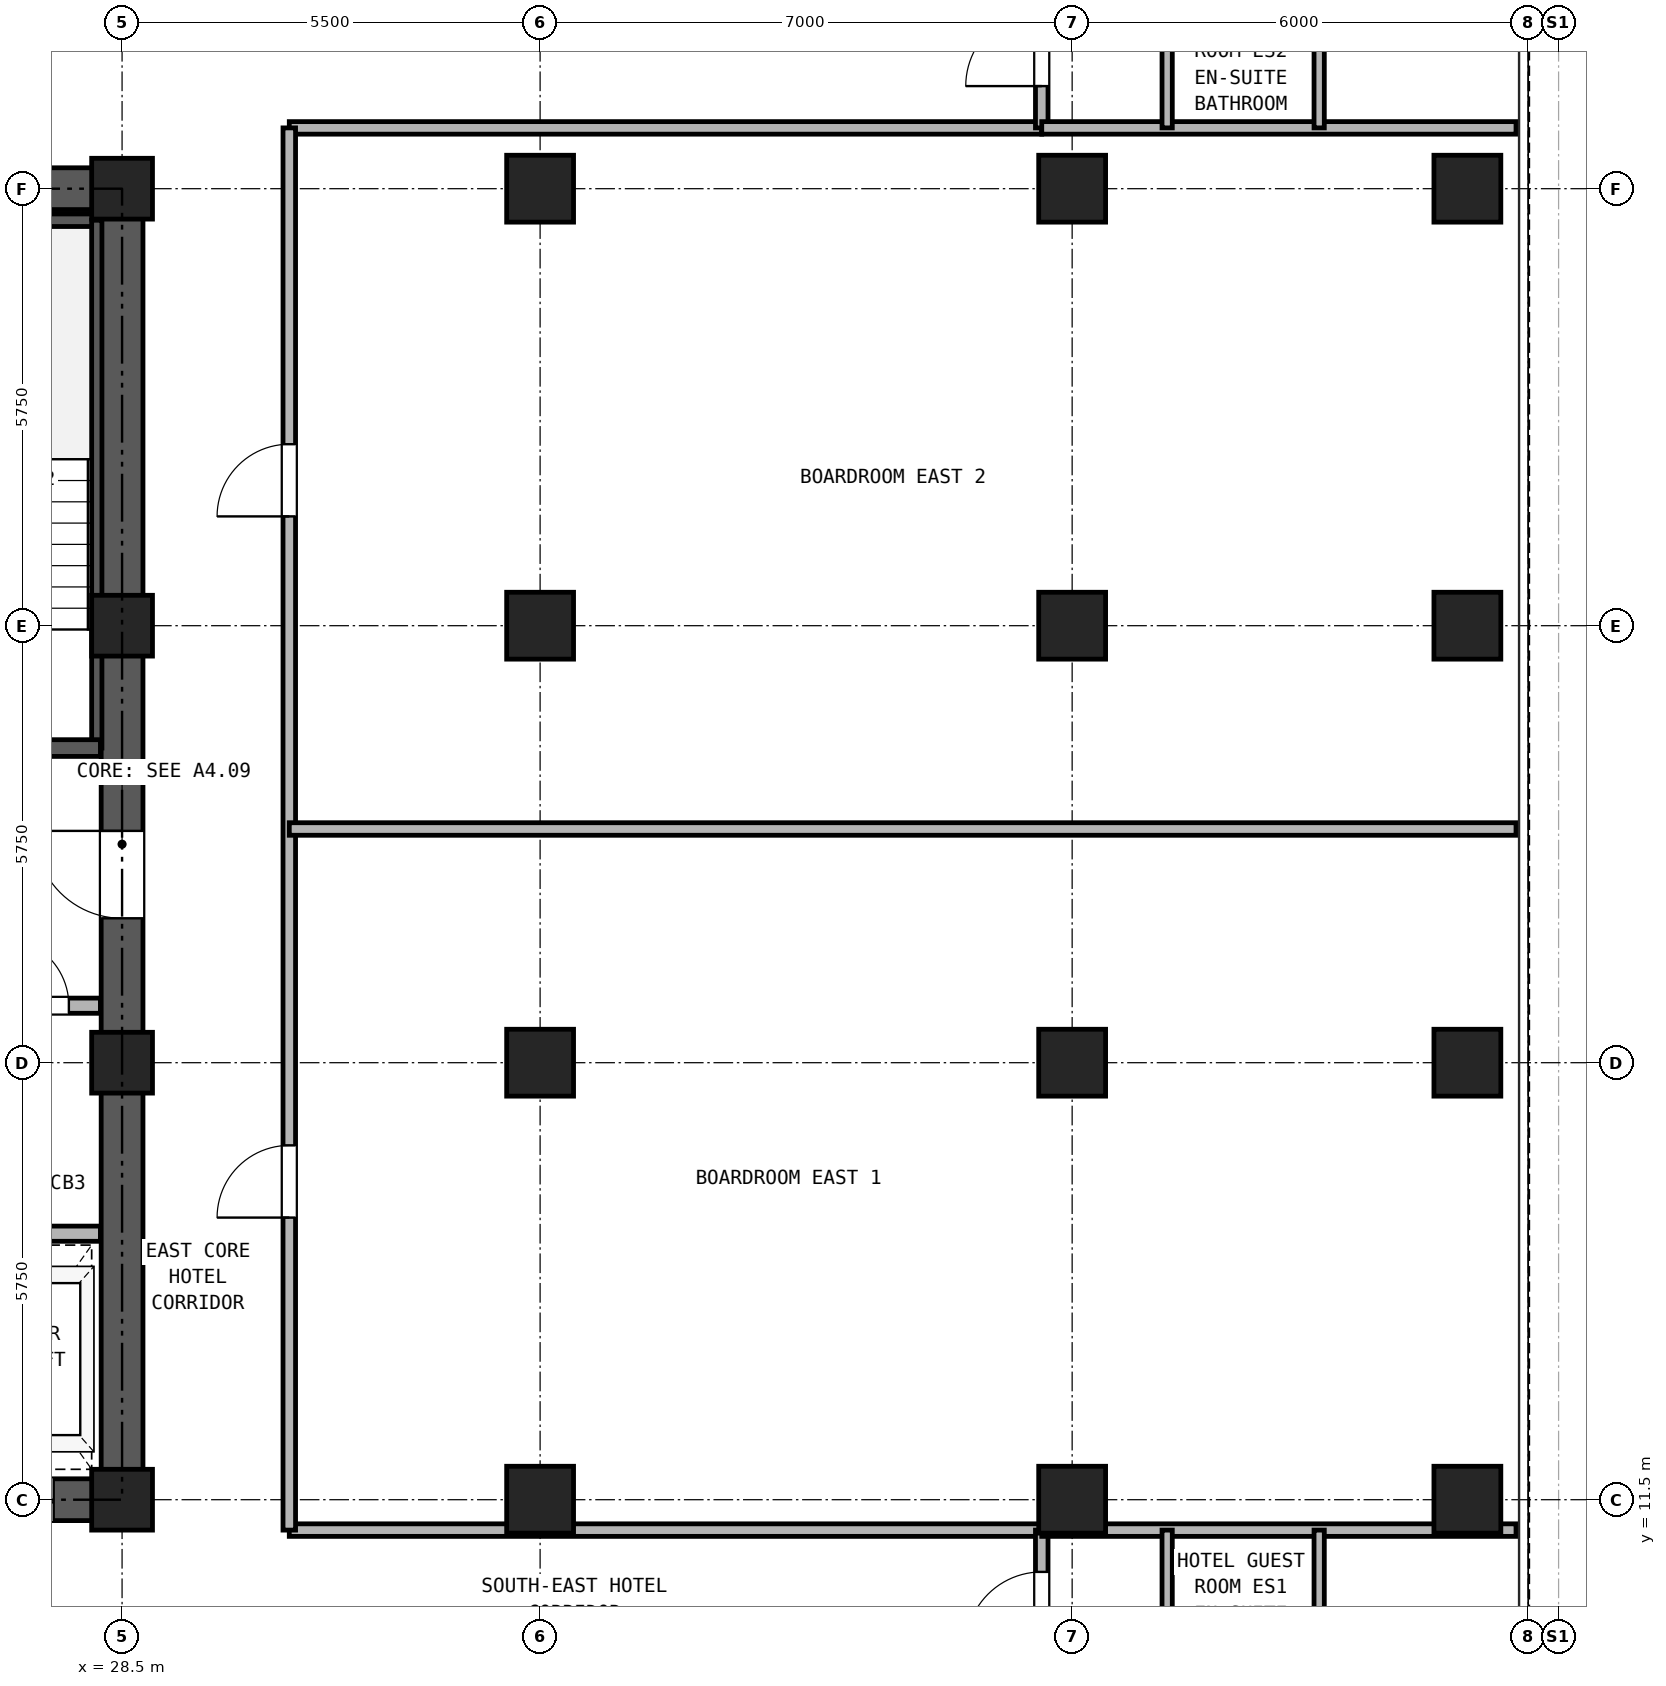
"""IFC4 building model, lengths in metres.
Left out: names, types, materials, properties, quantities, classifications, styles, units other than length and angle.
Written with IfcOpenShell. Run it as: python <this file> out.ifc"""

import sys

from ifc_helpers import new_model, si_unit, direction, frame, frame_2d, origin, origin_2d, place, context, subcontext, project, spatial, rectangle, hollow_rectangle, extrude, source, transform, mapped, element, fill, save


model = new_model("IFC4")
c1 = context("Model", 3, precision=1e-05, world=origin(), true_north=direction((0.0, 1.0)))
c2 = subcontext(c1, "Body", "Model", "MODEL_VIEW")
j1 = project(units=[si_unit("LENGTHUNIT", "METRE"), si_unit("PLANEANGLEUNIT", "RADIAN")], contexts=[c1])
p1 = place(None, origin())
s1 = spatial("IfcSite", under=j1, at=p1, CompositionType="ELEMENT")
p2 = place(p1, origin())
s2 = spatial("IfcBuilding", under=s1, at=p2, CompositionType="ELEMENT")
p3 = place(p2, frame((0.0, 0.0, 105.5)))
s3 = spatial("IfcBuildingStorey", under=s2, at=p3, CompositionType="ELEMENT", Elevation=105.5)
m1 = source(origin(), c2, "Body", "SweptSolid", [
    extrude(hollow_rectangle(XDim=0.88, YDim=0.88, WallThickness=0.05, at=origin_2d()), origin(), (0.0, 0.0, 1.0), 2.95),
])
for number, where, z_axis, x_axis in (
    (1, (46.2, 11.5, 0.0), (0.0, 0.0, 1.0), (1.0, 0.0, 0.0)),
    (2, (46.2, 17.25, 0.0), (0.0, 0.0, 1.0), (1.0, 0.0, 0.0)),
    (3, (46.2, 23.0, 0.0), (0.0, 0.0, 1.0), (1.0, 0.0, 0.0)),
    (4, (46.2, 28.75, 0.0), (0.0, 0.0, 1.0), (1.0, 0.0, 0.0)),
):
    element("IfcColumn", number, at=place(p3, frame(where, z_axis=z_axis, x_axis=x_axis)), inside=s3, PredefinedType="COLUMN", context=c2, shape_type="MappedRepresentation", body=[
        mapped(m1, transform((0.0, 0.0, 0.0), x_axis=(1.0, 0.0, 0.0), y_axis=(0.0, 1.0, 0.0), z_axis=(0.0, 0.0, 1.0), scale=1.0)),
    ])
m2 = source(origin(), c2, "Body", "SweptSolid", [
    extrude(hollow_rectangle(XDim=0.8, YDim=0.8, WallThickness=0.045, at=origin_2d()), origin(), (0.0, 0.0, 1.0), 2.95),
])
for number, where, z_axis, x_axis in (
    (5, (28.5, 11.5, 0.0), (0.0, 0.0, 1.0), (1.0, 0.0, 0.0)),
    (6, (28.5, 17.25, 0.0), (0.0, 0.0, 1.0), (1.0, 0.0, 0.0)),
    (7, (28.5, 23.0, 0.0), (0.0, 0.0, 1.0), (1.0, 0.0, 0.0)),
    (8, (28.5, 28.75, 0.0), (0.0, 0.0, 1.0), (1.0, 0.0, 0.0)),
):
    element("IfcColumn", number, at=place(p3, frame(where, z_axis=z_axis, x_axis=x_axis)), inside=s3, PredefinedType="COLUMN", context=c2, shape_type="MappedRepresentation", body=[
        mapped(m2, transform((0.0, 0.0, 0.0), x_axis=(1.0, 0.0, 0.0), y_axis=(0.0, 1.0, 0.0), z_axis=(0.0, 0.0, 1.0), scale=1.0)),
    ])
for number, where, z_axis, x_axis in (
    (9, (34.0, 11.5, 0.0), (0.0, 0.0, 1.0), (1.0, 0.0, 0.0)),
    (10, (34.0, 17.25, 0.0), (0.0, 0.0, 1.0), (1.0, 0.0, 0.0)),
    (11, (34.0, 23.0, 0.0), (0.0, 0.0, 1.0), (1.0, 0.0, 0.0)),
    (12, (34.0, 28.75, 0.0), (0.0, 0.0, 1.0), (1.0, 0.0, 0.0)),
    (13, (41.0, 11.5, 0.0), (0.0, 0.0, 1.0), (1.0, 0.0, 0.0)),
    (14, (41.0, 17.25, 0.0), (0.0, 0.0, 1.0), (1.0, 0.0, 0.0)),
    (15, (41.0, 23.0, 0.0), (0.0, 0.0, 1.0), (1.0, 0.0, 0.0)),
    (16, (41.0, 28.75, 0.0), (0.0, 0.0, 1.0), (1.0, 0.0, 0.0)),
):
    element("IfcColumn", number, at=place(p3, frame(where, z_axis=z_axis, x_axis=x_axis)), inside=s3, PredefinedType="COLUMN", context=c2, shape_type="MappedRepresentation", body=[
        mapped(m1, transform((0.0, 0.0, 0.0), x_axis=(1.0, 0.0, 0.0), y_axis=(0.0, 1.0, 0.0), z_axis=(0.0, 0.0, 1.0), scale=1.0)),
    ])
p4 = place(p3, frame((18.225, 11.5, 0.0), z_axis=(0.0, 0.0, 1.0), x_axis=(1.0, 0.0, 0.0)))
e17 = element("IfcWall", 17, at=p4, inside=s3, PredefinedType="SHEAR", context=c2, shape_type="SweptSolid", body=[
    extrude(rectangle(XDim=10.55, YDim=0.55, at=frame_2d((5.275, 0.0))), origin(), (0.0, 0.0, 1.0), 2.95),
])
p5 = place(p4, frame((2.375, 0.0, 0.0)))
e18 = element("IfcOpeningElement", 18, at=p5, cuts=e17, PredefinedType="OPENING", context=c2, shape_type="SweptSolid", body=[
    extrude(rectangle(XDim=0.95, YDim=2.15, at=frame_2d((0.475, 1.075))), frame((0.0, 0.285, 0.0), z_axis=(0.0, -1.0, 0.0), x_axis=(1.0, 0.0, 0.0)), (0.0, 0.0, 1.0), 0.57),
])
p6 = place(p4, frame((5.875, 0.0, 0.0)))
e19 = element("IfcOpeningElement", 19, at=p6, cuts=e17, PredefinedType="OPENING", context=c2, shape_type="SweptSolid", body=[
    extrude(rectangle(XDim=1.1, YDim=2.25, at=frame_2d((0.55, 1.125))), frame((0.0, 0.285, 0.0), z_axis=(0.0, -1.0, 0.0), x_axis=(1.0, 0.0, 0.0)), (0.0, 0.0, 1.0), 0.57),
])
p7 = place(p4, frame((8.275, 0.0, 0.0)))
e20 = element("IfcOpeningElement", 20, at=p7, cuts=e17, PredefinedType="OPENING", context=c2, shape_type="SweptSolid", body=[
    extrude(rectangle(XDim=1.1, YDim=2.25, at=frame_2d((0.55, 1.125))), frame((0.0, 0.285, 0.0), z_axis=(0.0, -1.0, 0.0), x_axis=(1.0, 0.0, 0.0)), (0.0, 0.0, 1.0), 0.57),
])
p8 = place(p3, frame((18.225, 28.75, 0.0), z_axis=(0.0, 0.0, 1.0), x_axis=(1.0, 0.0, 0.0)))
e21 = element("IfcWall", 21, at=p8, inside=s3, PredefinedType="SHEAR", context=c2, shape_type="SweptSolid", body=[
    extrude(rectangle(XDim=10.55, YDim=0.55, at=frame_2d((5.275, 0.0))), origin(), (0.0, 0.0, 1.0), 2.95),
])
p9 = place(p8, frame((4.155, 0.0, 0.0)))
e22 = element("IfcOpeningElement", 22, at=p9, cuts=e21, PredefinedType="OPENING", context=c2, shape_type="SweptSolid", body=[
    extrude(rectangle(XDim=0.9, YDim=2.05, at=frame_2d((0.45, 1.025))), frame((0.0, 0.285, 0.0), z_axis=(0.0, -1.0, 0.0), x_axis=(1.0, 0.0, 0.0)), (0.0, 0.0, 1.0), 0.57),
])
p10 = place(p8, frame((5.695, 0.0, 0.0)))
e23 = element("IfcOpeningElement", 23, at=p10, cuts=e21, PredefinedType="OPENING", context=c2, shape_type="SweptSolid", body=[
    extrude(rectangle(XDim=0.9, YDim=2.05, at=frame_2d((0.45, 1.025))), frame((0.0, 0.285, 0.0), z_axis=(0.0, -1.0, 0.0), x_axis=(1.0, 0.0, 0.0)), (0.0, 0.0, 1.0), 0.57),
])
p11 = place(p3, frame((28.5, 11.775, 0.0), z_axis=(0.0, 0.0, 1.0), x_axis=(0.0, 1.0, 0.0)))
e24 = element("IfcWall", 24, at=p11, inside=s3, PredefinedType="SHEAR", context=c2, shape_type="SweptSolid", body=[
    extrude(rectangle(XDim=16.7, YDim=0.55, at=frame_2d((8.35, 0.0))), origin(), (0.0, 0.0, 1.0), 2.95),
])
p12 = place(p11, frame((7.375, 0.0, 0.0)))
e25 = element("IfcOpeningElement", 25, at=p12, cuts=e24, PredefinedType="OPENING", context=c2, shape_type="SweptSolid", body=[
    extrude(rectangle(XDim=1.15, YDim=2.2, at=frame_2d((0.575, 1.1))), frame((0.0, 0.285, 0.0), z_axis=(0.0, -1.0, 0.0), x_axis=(1.0, 0.0, 0.0)), (0.0, 0.0, 1.0), 0.57),
])
p13 = place(p3, frame((25.13, 28.335, 0.0), z_axis=(0.0, 0.0, 1.0), x_axis=(1.0, 0.0, 0.0)))
e26 = element("IfcWall", 26, at=p13, inside=s3, PredefinedType="PARTITIONING", context=c2, shape_type="SweptSolid", body=[
    extrude(rectangle(XDim=3.085, YDim=0.165, at=frame_2d((1.542, 0.0))), origin(), (0.0, 0.0, 1.0), 2.95),
])
p14 = place(p3, frame((28.167, 21.39, 0.0), z_axis=(0.0, 0.0, 1.0), x_axis=(0.0, 1.0, 0.0)))
e27 = element("IfcWall", 27, at=p14, inside=s3, PredefinedType="PARTITIONING", context=c2, shape_type="SweptSolid", body=[
    extrude(rectangle(XDim=6.945, YDim=0.135, at=frame_2d((3.473, 0.0))), origin(), (0.0, 0.0, 1.0), 2.95),
])
p15 = place(p3, frame((25.13, 21.39, 0.0), z_axis=(0.0, 0.0, 1.0), x_axis=(1.0, 0.0, 0.0)))
e28 = element("IfcWall", 28, at=p15, inside=s3, PredefinedType="SOLIDWALL", context=c2, shape_type="SweptSolid", body=[
    extrude(rectangle(XDim=3.085, YDim=0.22, at=frame_2d((1.542, 0.0))), origin(), (0.0, 0.0, 1.0), 2.95),
])
p16 = place(p15, frame((0.92, 0.0, 0.0)))
e29 = element("IfcOpeningElement", 29, at=p16, cuts=e28, PredefinedType="OPENING", context=c2, shape_type="SweptSolid", body=[
    extrude(rectangle(XDim=1.15, YDim=2.2, at=frame_2d((0.575, 1.1))), frame((0.0, 0.12, 0.0), z_axis=(0.0, -1.0, 0.0), x_axis=(1.0, 0.0, 0.0)), (0.0, 0.0, 1.0), 0.24),
])
p17 = place(p3, frame((18.785, 18.0, 0.0), z_axis=(0.0, 0.0, 1.0), x_axis=(1.0, 0.0, 0.0)))
e30 = element("IfcWall", 30, at=p17, inside=s3, PredefinedType="PARTITIONING", context=c2, shape_type="SweptSolid", body=[
    extrude(rectangle(XDim=9.43, YDim=0.2, at=frame_2d((4.715, 0.0))), origin(), (0.0, 0.0, 1.0), 2.95),
])
p18 = place(p17, frame((0.465, 0.0, 0.0)))
e31 = element("IfcOpeningElement", 31, at=p18, cuts=e30, PredefinedType="OPENING", context=c2, shape_type="SweptSolid", body=[
    extrude(rectangle(XDim=1.3, YDim=2.3, at=frame_2d((0.65, 1.15))), frame((0.0, 0.11, 0.0), z_axis=(0.0, -1.0, 0.0), x_axis=(1.0, 0.0, 0.0)), (0.0, 0.0, 1.0), 0.22),
])
p19 = place(p17, frame((2.565, 0.0, 0.0)))
e32 = element("IfcOpeningElement", 32, at=p19, cuts=e30, PredefinedType="OPENING", context=c2, shape_type="SweptSolid", body=[
    extrude(rectangle(XDim=1.3, YDim=2.3, at=frame_2d((0.65, 1.15))), frame((0.0, 0.11, 0.0), z_axis=(0.0, -1.0, 0.0), x_axis=(1.0, 0.0, 0.0)), (0.0, 0.0, 1.0), 0.22),
])
p20 = place(p17, frame((4.985, 0.0, 0.0)))
e33 = element("IfcOpeningElement", 33, at=p20, cuts=e30, PredefinedType="OPENING", context=c2, shape_type="SweptSolid", body=[
    extrude(rectangle(XDim=0.9, YDim=2.05, at=frame_2d((0.45, 1.025))), frame((0.0, 0.11, 0.0), z_axis=(0.0, -1.0, 0.0), x_axis=(1.0, 0.0, 0.0)), (0.0, 0.0, 1.0), 0.22),
])
p21 = place(p17, frame((8.115, 0.0, 0.0)))
e34 = element("IfcOpeningElement", 34, at=p21, cuts=e30, PredefinedType="OPENING", context=c2, shape_type="SweptSolid", body=[
    extrude(rectangle(XDim=0.9, YDim=2.05, at=frame_2d((0.45, 1.025))), frame((0.0, 0.11, 0.0), z_axis=(0.0, -1.0, 0.0), x_axis=(1.0, 0.0, 0.0)), (0.0, 0.0, 1.0), 0.22),
])
p22 = place(p3, frame((18.785, 15.0, 0.0), z_axis=(0.0, 0.0, 1.0), x_axis=(1.0, 0.0, 0.0)))
e35 = element("IfcWall", 35, at=p22, inside=s3, PredefinedType="PARTITIONING", context=c2, shape_type="SweptSolid", body=[
    extrude(rectangle(XDim=9.43, YDim=0.2, at=frame_2d((4.715, 0.0))), origin(), (0.0, 0.0, 1.0), 2.95),
])
for number, where, z_axis, x_axis in (
    (36, (30.7, 11.1, 0.0), (0.0, 0.0, 1.0), (1.0, 0.0, 0.0)),
    (37, (30.7, 29.55, 0.0), (0.0, 0.0, 1.0), (1.0, 0.0, 0.0)),
):
    element("IfcWall", number, at=place(p3, frame(where, z_axis=z_axis, x_axis=x_axis)), inside=s3, PredefinedType="PARTITIONING", context=c2, shape_type="SweptSolid", body=[
        extrude(rectangle(XDim=9.9, YDim=0.165, at=frame_2d((4.95, 0.0))), origin(), (0.0, 0.0, 1.0), 2.95),
    ])
p23 = place(p3, frame((30.7, 11.1, 0.0), z_axis=(0.0, 0.0, 1.0), x_axis=(0.0, 1.0, 0.0)))
e38 = element("IfcWall", 38, at=p23, inside=s3, PredefinedType="PARTITIONING", context=c2, shape_type="SweptSolid", body=[
    extrude(rectangle(XDim=18.45, YDim=0.165, at=frame_2d((9.225, 0.0))), origin(), (0.0, 0.0, 1.0), 2.95),
])
p24 = place(p23, frame((4.112, 0.0, 0.0)))
e39 = element("IfcOpeningElement", 39, at=p24, cuts=e38, PredefinedType="OPENING", context=c2, shape_type="SweptSolid", body=[
    extrude(rectangle(XDim=0.95, YDim=2.15, at=frame_2d((0.475, 1.075))), frame((0.0, 0.093, 0.0), z_axis=(0.0, -1.0, 0.0), x_axis=(1.0, 0.0, 0.0)), (0.0, 0.0, 1.0), 0.185),
])
p25 = place(p23, frame((13.338, 0.0, 0.0)))
e40 = element("IfcOpeningElement", 40, at=p25, cuts=e38, PredefinedType="OPENING", context=c2, shape_type="SweptSolid", body=[
    extrude(rectangle(XDim=0.95, YDim=2.15, at=frame_2d((0.475, 1.075))), frame((0.0, 0.093, 0.0), z_axis=(0.0, -1.0, 0.0), x_axis=(1.0, 0.0, 0.0)), (0.0, 0.0, 1.0), 0.185),
])
p26 = place(p3, frame((40.6, 0.16, 0.0), z_axis=(0.0, 0.0, 1.0), x_axis=(0.0, 1.0, 0.0)))
e41 = element("IfcWall", 41, at=p26, inside=s3, PredefinedType="PARTITIONING", context=c2, shape_type="SweptSolid", body=[
    extrude(rectangle(XDim=10.94, YDim=0.165, at=frame_2d((5.47, 0.0))), origin(), (0.0, 0.0, 1.0), 2.95),
])
p27 = place(p26, frame((9.39, 0.0, 0.0)))
e42 = element("IfcOpeningElement", 42, at=p27, cuts=e41, PredefinedType="OPENING", context=c2, shape_type="SweptSolid", body=[
    extrude(rectangle(XDim=1.0, YDim=2.15, at=frame_2d((0.5, 1.075))), frame((0.0, 0.093, 0.0), z_axis=(0.0, -1.0, 0.0), x_axis=(1.0, 0.0, 0.0)), (0.0, 0.0, 1.0), 0.185),
])
p28 = place(p3, frame((40.6, 29.55, 0.0), z_axis=(0.0, 0.0, 1.0), x_axis=(0.0, 1.0, 0.0)))
e43 = element("IfcWall", 43, at=p28, inside=s3, PredefinedType="PARTITIONING", context=c2, shape_type="SweptSolid", body=[
    extrude(rectangle(XDim=5.59, YDim=0.165, at=frame_2d((2.795, 0.0))), origin(), (0.0, 0.0, 1.0), 2.95),
])
p29 = place(p28, frame((0.55, 0.0, 0.0)))
e44 = element("IfcOpeningElement", 44, at=p29, cuts=e43, PredefinedType="OPENING", context=c2, shape_type="SweptSolid", body=[
    extrude(rectangle(XDim=1.0, YDim=2.15, at=frame_2d((0.5, 1.075))), frame((0.0, 0.093, 0.0), z_axis=(0.0, -1.0, 0.0), x_axis=(1.0, 0.0, 0.0)), (0.0, 0.0, 1.0), 0.185),
])
for number, where, z_axis, x_axis in (
    (45, (40.6, 11.1, 0.0), (0.0, 0.0, 1.0), (1.0, 0.0, 0.0)),
    (46, (40.6, 29.55, 0.0), (0.0, 0.0, 1.0), (1.0, 0.0, 0.0)),
):
    element("IfcWall", number, at=place(p3, frame(where, z_axis=z_axis, x_axis=x_axis)), inside=s3, PredefinedType="PARTITIONING", context=c2, shape_type="SweptSolid", body=[
        extrude(rectangle(XDim=6.24, YDim=0.165, at=frame_2d((3.12, 0.0))), origin(), (0.0, 0.0, 1.0), 2.95),
    ])
for number, where, z_axis, x_axis in (
    (47, (42.25, 9.0, 0.0), (0.0, 0.0, 1.0), (0.0, 1.0, 0.0)),
    (48, (44.25, 9.0, 0.0), (0.0, 0.0, 1.0), (0.0, 1.0, 0.0)),
):
    element("IfcWall", number, at=place(p3, frame(where, z_axis=z_axis, x_axis=x_axis)), inside=s3, PredefinedType="PARTITIONING", context=c2, shape_type="SweptSolid", body=[
        extrude(rectangle(XDim=2.1, YDim=0.135, at=frame_2d((1.05, 0.0))), origin(), (0.0, 0.0, 1.0), 2.95),
    ])
for number, where, z_axis, x_axis in (
    (49, (42.25, 29.55, 0.0), (0.0, 0.0, 1.0), (0.0, 1.0, 0.0)),
    (50, (44.25, 29.55, 0.0), (0.0, 0.0, 1.0), (0.0, 1.0, 0.0)),
):
    element("IfcWall", number, at=place(p3, frame(where, z_axis=z_axis, x_axis=x_axis)), inside=s3, PredefinedType="PARTITIONING", context=c2, shape_type="SweptSolid", body=[
        extrude(rectangle(XDim=2.1, YDim=0.135, at=frame_2d((1.05, 0.0))), origin(), (0.0, 0.0, 1.0), 2.95),
    ])
p30 = place(p3, frame((30.7, 20.325, 0.0), z_axis=(0.0, 0.0, 1.0), x_axis=(1.0, 0.0, 0.0)))
e51 = element("IfcWall", 51, at=p30, inside=s3, PredefinedType="PARTITIONING", context=c2, shape_type="SweptSolid", body=[
    extrude(rectangle(XDim=16.14, YDim=0.165, at=frame_2d((8.07, 0.0))), origin(), (0.0, 0.0, 1.0), 2.583),
])
p31 = place(p21, frame((0.9, 0.0, 0.0), z_axis=(0.0, 0.0, 1.0), x_axis=(-1.0, 0.0, 0.0)))
e52 = element("IfcDoor", 52, at=p31, inside=s3, OperationType="SINGLE_SWING_LEFT", PredefinedType="DOOR", context=c2, shape_type="SweptSolid", body=[
    extrude(rectangle(XDim=0.9, YDim=2.05, at=frame_2d((0.45, 1.025))), frame((0.0, 0.025, 0.0), z_axis=(0.0, -1.0, 0.0), x_axis=(1.0, 0.0, 0.0)), (0.0, 0.0, 1.0), 0.05),
])
fill(e34, e52)
p32 = place(p12, origin())
e53 = element("IfcDoor", 53, at=p32, inside=s3, OperationType="SINGLE_SWING_RIGHT", PredefinedType="DOOR", context=c2, shape_type="SweptSolid", body=[
    extrude(rectangle(XDim=1.15, YDim=2.2, at=frame_2d((0.575, 1.1))), frame((0.0, 0.025, 0.0), z_axis=(0.0, -1.0, 0.0), x_axis=(1.0, 0.0, 0.0)), (0.0, 0.0, 1.0), 0.05),
])
fill(e25, e53)
p33 = place(p7, frame((1.1, 0.0, 0.0), z_axis=(0.0, 0.0, 1.0), x_axis=(-1.0, 0.0, 0.0)))
e54 = element("IfcDoor", 54, at=p33, inside=s3, OperationType="DOUBLE_DOOR_SLIDING", PredefinedType="DOOR", context=c2, shape_type="SweptSolid", body=[
    extrude(rectangle(XDim=1.1, YDim=2.25, at=frame_2d((0.55, 1.125))), frame((0.0, 0.025, 0.0), z_axis=(0.0, -1.0, 0.0), x_axis=(1.0, 0.0, 0.0)), (0.0, 0.0, 1.0), 0.05),
])
fill(e20, e54)
p34 = place(p27, frame((1.0, 0.0, 0.0), z_axis=(0.0, 0.0, 1.0), x_axis=(-1.0, 0.0, 0.0)))
e55 = element("IfcDoor", 55, at=p34, inside=s3, OperationType="SINGLE_SWING_LEFT", PredefinedType="DOOR", context=c2, shape_type="SweptSolid", body=[
    extrude(rectangle(XDim=1.0, YDim=2.15, at=frame_2d((0.5, 1.075))), frame((0.0, 0.025, 0.0), z_axis=(0.0, -1.0, 0.0), x_axis=(1.0, 0.0, 0.0)), (0.0, 0.0, 1.0), 0.05),
])
fill(e42, e55)
p35 = place(p29, frame((1.0, 0.0, 0.0), z_axis=(0.0, 0.0, 1.0), x_axis=(-1.0, 0.0, 0.0)))
e56 = element("IfcDoor", 56, at=p35, inside=s3, OperationType="SINGLE_SWING_LEFT", PredefinedType="DOOR", context=c2, shape_type="SweptSolid", body=[
    extrude(rectangle(XDim=1.0, YDim=2.15, at=frame_2d((0.5, 1.075))), frame((0.0, 0.025, 0.0), z_axis=(0.0, -1.0, 0.0), x_axis=(1.0, 0.0, 0.0)), (0.0, 0.0, 1.0), 0.05),
])
fill(e44, e56)
p36 = place(p24, origin())
e57 = element("IfcDoor", 57, at=p36, inside=s3, OperationType="SINGLE_SWING_LEFT", PredefinedType="DOOR", context=c2, shape_type="SweptSolid", body=[
    extrude(rectangle(XDim=0.95, YDim=2.15, at=frame_2d((0.475, 1.075))), frame((0.0, 0.025, 0.0), z_axis=(0.0, -1.0, 0.0), x_axis=(1.0, 0.0, 0.0)), (0.0, 0.0, 1.0), 0.05),
])
fill(e39, e57)
p37 = place(p25, origin())
e58 = element("IfcDoor", 58, at=p37, inside=s3, OperationType="SINGLE_SWING_LEFT", PredefinedType="DOOR", context=c2, shape_type="SweptSolid", body=[
    extrude(rectangle(XDim=0.95, YDim=2.15, at=frame_2d((0.475, 1.075))), frame((0.0, 0.025, 0.0), z_axis=(0.0, -1.0, 0.0), x_axis=(1.0, 0.0, 0.0)), (0.0, 0.0, 1.0), 0.05),
])
fill(e40, e58)
save(model, sys.argv[1])
